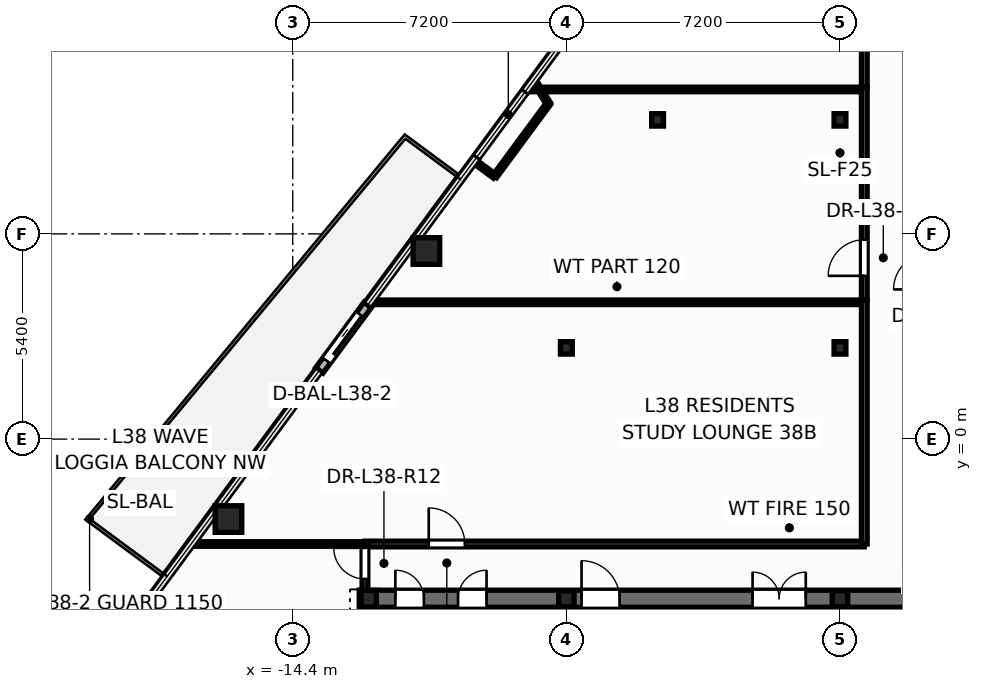
"""IFC4 building model, lengths in metres.
Left out: names, types, materials, properties, quantities, classifications, styles, units other than length and angle.
Written with IfcOpenShell. Run it as: python <this file> out.ifc"""

import sys

from ifc_helpers import new_model, si_unit, direction, frame, frame_2d, origin, origin_2d, place, context, subcontext, project, spatial, rectangle, hollow_circle, i_section, extrude, element, fill, save


model = new_model("IFC4")
c1 = context("Model", 3, precision=1e-05, world=origin(), true_north=direction((0.0, 1.0)))
c2 = subcontext(c1, "Body", "Model", "MODEL_VIEW")
j1 = project(units=[si_unit("LENGTHUNIT", "METRE"), si_unit("PLANEANGLEUNIT", "RADIAN")], contexts=[c1])
p1 = place(None, origin())
s1 = spatial("IfcSite", under=j1, at=p1, CompositionType="ELEMENT")
p2 = place(p1, origin())
s2 = spatial("IfcBuilding", under=s1, at=p2, CompositionType="ELEMENT")
p3 = place(p2, frame((0.0, 0.0, 147.3)))
s3 = spatial("IfcBuildingStorey", under=s2, at=p3, CompositionType="ELEMENT", Elevation=147.3)
for number, where, z_axis, x_axis in (
    (1, (-10.883, 4.95, 0.0), (0.0, 0.0, 1.0), (1.0, 0.0, 0.0)),
    (2, (-16.092, -2.103, 0.0), (0.0, 0.0, 1.0), (1.0, 0.0, 0.0)),
):
    element("IfcColumn", number, at=place(p3, frame(where, z_axis=z_axis, x_axis=x_axis)), inside=s3, PredefinedType="COLUMN", context=c2, shape_type="SweptSolid", body=[
        extrude(hollow_circle(Radius=0.35, WallThickness=0.03, at=origin_2d()), origin(), (0.0, 0.0, 1.0), 3.6),
    ])
p4 = place(p3, frame((-12.4, -4.2, 0.0), z_axis=(0.0, 0.0, 1.0), x_axis=(1.0, 0.0, 0.0)))
e3 = element("IfcColumn", 3, at=p4, inside=s3, PredefinedType="COLUMN", context=c2, shape_type="SweptSolid", body=[
    extrude(i_section(OverallWidth=0.4, OverallDepth=0.44, WebThickness=0.028, FlangeThickness=0.04, at=origin_2d()), origin(), (0.0, 0.0, 1.0), 3.6),
])
for number, where, z_axis, x_axis in (
    (4, (-7.2, -4.2, 0.0), (0.0, 0.0, 1.0), (1.0, 0.0, 0.0)),
    (5, (0.0, -4.2, 0.0), (0.0, 0.0, 1.0), (1.0, 0.0, 0.0)),
):
    element("IfcColumn", number, at=place(p3, frame(where, z_axis=z_axis, x_axis=x_axis)), inside=s3, PredefinedType="PILASTER", context=c2, shape_type="SweptSolid", body=[
        extrude(i_section(OverallWidth=0.405, OverallDepth=0.414, WebThickness=0.022, FlangeThickness=0.032, at=origin_2d()), origin(), (0.0, 0.0, 1.0), 3.6),
    ])
for number, where, z_axis, x_axis in (
    (6, (-7.2, 2.4, 0.0), (0.0, 0.0, 1.0), (1.0, 0.0, 0.0)),
    (7, (0.0, 2.4, 0.0), (0.0, 0.0, 1.0), (1.0, 0.0, 0.0)),
    (8, (-4.8, 8.4, 0.0), (0.0, 0.0, 1.0), (1.0, 0.0, 0.0)),
    (9, (0.0, 8.4, 0.0), (0.0, 0.0, 1.0), (1.0, 0.0, 0.0)),
):
    element("IfcColumn", number, at=place(p3, frame(where, z_axis=z_axis, x_axis=x_axis)), inside=s3, PredefinedType="COLUMN", context=c2, shape_type="SweptSolid", body=[
        extrude(i_section(OverallWidth=0.311, OverallDepth=0.327, WebThickness=0.016, FlangeThickness=0.025, at=origin_2d()), origin(), (0.0, 0.0, 1.0), 3.6),
    ])
p5 = place(p3, frame((-12.429, 3.529, -0.015), z_axis=(0.0, 0.0, 1.0), x_axis=(-0.594050978498, -0.804427395696, 0.0)))
e10 = element("IfcWall", 10, at=p5, inside=s3, PredefinedType="STANDARD", context=c2, shape_type="SweptSolid", body=[
    extrude(rectangle(XDim=2.14, YDim=0.24, at=frame_2d((1.07, 0.0))), origin(), (0.0, 0.0, 1.0), 2.807),
])
p6 = place(p5, frame((0.32, 0.0, 0.015)))
e11 = element("IfcOpeningElement", 11, at=p6, cuts=e10, PredefinedType="OPENING", context=c2, shape_type="SweptSolid", body=[
    extrude(rectangle(XDim=1.506, YDim=2.204, at=frame_2d((0.75, 1.102))), frame((0.0, 0.13, 0.0), z_axis=(0.0, -1.0, 0.0), x_axis=(1.0, 0.0, 0.0)), (0.0, 0.0, 1.0), 0.26),
])
p7 = place(p3, frame((-2.88, -7.1, 0.0), z_axis=(0.0, 0.0, 1.0), x_axis=(0.0, 1.0, 0.0)))
e12 = element("IfcWall", 12, at=p7, inside=s3, PredefinedType="PARTITIONING", context=c2, shape_type="SweptSolid", body=[
    extrude(rectangle(XDim=2.65, YDim=0.15, at=frame_2d((1.325, 0.0))), origin(), (0.0, 0.0, 1.0), 3.35),
])
p8 = place(p7, frame((0.85, 0.0, 0.0)))
e13 = element("IfcOpeningElement", 13, at=p8, cuts=e12, PredefinedType="OPENING", context=c2, shape_type="SweptSolid", body=[
    extrude(rectangle(XDim=0.886, YDim=2.104, at=frame_2d((0.44, 1.052))), frame((0.0, 0.085, 0.0), z_axis=(0.0, -1.0, 0.0), x_axis=(1.0, 0.0, 0.0)), (0.0, 0.0, 1.0), 0.17),
])
p9 = place(p3, frame((-10.2, -5.52, 0.0), z_axis=(0.0, 0.0, 1.0), x_axis=(0.0, 1.0, 0.0)))
e14 = element("IfcWall", 14, at=p9, inside=s3, PredefinedType="PARTITIONING", context=c2, shape_type="SweptSolid", body=[
    extrude(rectangle(XDim=1.12, YDim=0.12, at=frame_2d((0.56, 0.0))), origin(), (0.0, 0.0, 1.0), 3.35),
])
p10 = place(p3, frame((-12.65, -4.2, 0.0), z_axis=(0.0, 0.0, 1.0), x_axis=(1.0, 0.0, 0.0)))
e15 = element("IfcWall", 15, at=p10, inside=s3, PredefinedType="SHEAR", context=c2, shape_type="SweptSolid", body=[
    extrude(rectangle(XDim=25.3, YDim=0.45, at=frame_2d((12.65, 0.0))), origin(), (0.0, 0.0, 1.0), 3.6),
])
p11 = place(p10, frame((0.95, 0.0, 0.0)))
e16 = element("IfcOpeningElement", 16, at=p11, cuts=e15, PredefinedType="OPENING", context=c2, shape_type="SweptSolid", body=[
    extrude(rectangle(XDim=0.756, YDim=2.054, at=frame_2d((0.375, 1.027))), frame((0.0, 0.235, 0.0), z_axis=(0.0, -1.0, 0.0), x_axis=(1.0, 0.0, 0.0)), (0.0, 0.0, 1.0), 0.47),
])
p12 = place(p10, frame((2.6, 0.0, 0.0)))
e17 = element("IfcOpeningElement", 17, at=p12, cuts=e15, PredefinedType="OPENING", context=c2, shape_type="SweptSolid", body=[
    extrude(rectangle(XDim=0.756, YDim=2.054, at=frame_2d((0.375, 1.027))), frame((0.0, 0.235, 0.0), z_axis=(0.0, -1.0, 0.0), x_axis=(1.0, 0.0, 0.0)), (0.0, 0.0, 1.0), 0.47),
])
p13 = place(p10, frame((21.85, 0.0, 0.0)))
e18 = element("IfcOpeningElement", 18, at=p13, cuts=e15, PredefinedType="OPENING", context=c2, shape_type="SweptSolid", body=[
    extrude(rectangle(XDim=0.756, YDim=2.054, at=frame_2d((0.375, 1.027))), frame((0.0, 0.235, 0.0), z_axis=(0.0, -1.0, 0.0), x_axis=(1.0, 0.0, 0.0)), (0.0, 0.0, 1.0), 0.47),
])
p14 = place(p10, frame((23.5, 0.0, 0.0)))
e19 = element("IfcOpeningElement", 19, at=p14, cuts=e15, PredefinedType="OPENING", context=c2, shape_type="SweptSolid", body=[
    extrude(rectangle(XDim=0.756, YDim=2.054, at=frame_2d((0.375, 1.027))), frame((0.0, 0.235, 0.0), z_axis=(0.0, -1.0, 0.0), x_axis=(1.0, 0.0, 0.0)), (0.0, 0.0, 1.0), 0.47),
])
p15 = place(p10, frame((5.85, 0.0, 0.0)))
e20 = element("IfcOpeningElement", 20, at=p15, cuts=e15, PredefinedType="OPENING", context=c2, shape_type="SweptSolid", body=[
    extrude(rectangle(XDim=1.006, YDim=2.104, at=frame_2d((0.5, 1.052))), frame((0.0, 0.235, 0.0), z_axis=(0.0, -1.0, 0.0), x_axis=(1.0, 0.0, 0.0)), (0.0, 0.0, 1.0), 0.47),
])
p16 = place(p10, frame((10.35, 0.0, 0.0)))
e21 = element("IfcOpeningElement", 21, at=p16, cuts=e15, PredefinedType="OPENING", context=c2, shape_type="SweptSolid", body=[
    extrude(rectangle(XDim=1.406, YDim=2.154, at=frame_2d((0.7, 1.077))), frame((0.0, 0.235, 0.0), z_axis=(0.0, -1.0, 0.0), x_axis=(1.0, 0.0, 0.0)), (0.0, 0.0, 1.0), 0.47),
])
p17 = place(p10, frame((18.45, 0.0, 0.0)))
e22 = element("IfcOpeningElement", 22, at=p17, cuts=e15, PredefinedType="OPENING", context=c2, shape_type="SweptSolid", body=[
    extrude(rectangle(XDim=1.006, YDim=2.104, at=frame_2d((0.5, 1.052))), frame((0.0, 0.235, 0.0), z_axis=(0.0, -1.0, 0.0), x_axis=(1.0, 0.0, 0.0)), (0.0, 0.0, 1.0), 0.47),
])
p18 = place(p3, frame((-8.48, -13.85, 0.0), z_axis=(0.0, 0.0, 1.0), x_axis=(0.0, 1.0, 0.0)))
e23 = element("IfcWall", 23, at=p18, inside=s3, PredefinedType="SHEAR", context=c2, shape_type="SweptSolid", body=[
    extrude(rectangle(XDim=9.4, YDim=0.25, at=frame_2d((4.7, 0.0))), origin(), (0.0, 0.0, 1.0), 3.6),
])
p19 = place(p18, frame((6.95, 0.0, 0.0)))
e24 = element("IfcOpeningElement", 24, at=p19, cuts=e23, PredefinedType="OPENING", context=c2, shape_type="SweptSolid", body=[
    extrude(rectangle(XDim=1.006, YDim=2.104, at=frame_2d((0.5, 1.052))), frame((0.0, 0.135, 0.0), z_axis=(0.0, -1.0, 0.0), x_axis=(1.0, 0.0, 0.0)), (0.0, 0.0, 1.0), 0.27),
])
p20 = place(p3, frame((-5.12, -13.85, 0.0), z_axis=(0.0, 0.0, 1.0), x_axis=(0.0, 1.0, 0.0)))
e25 = element("IfcWall", 25, at=p20, inside=s3, PredefinedType="SHEAR", context=c2, shape_type="SweptSolid", body=[
    extrude(rectangle(XDim=9.4, YDim=0.25, at=frame_2d((4.7, 0.0))), origin(), (0.0, 0.0, 1.0), 3.6),
])
p21 = place(p3, frame((-12.4, -13.85, 0.0), z_axis=(0.0, 0.0, 1.0), x_axis=(0.0, 1.0, 0.0)))
e26 = element("IfcWall", 26, at=p21, inside=s3, PredefinedType="SHEAR", context=c2, shape_type="SweptSolid", body=[
    extrude(rectangle(XDim=9.4, YDim=0.45, at=frame_2d((4.7, 0.0))), origin(), (0.0, 0.0, 1.0), 3.6),
])
p22 = place(p3, frame((-12.5, -2.76, 0.0), z_axis=(0.0, 0.0, 1.0), x_axis=(1.0, 0.0, 0.0)))
e27 = element("IfcWall", 27, at=p22, inside=s3, PredefinedType="PARTITIONING", context=c2, shape_type="SweptSolid", body=[
    extrude(rectangle(XDim=13.14, YDim=0.15, at=frame_2d((6.57, 0.0))), origin(), (0.0, 0.0, 1.0), 2.325),
])
p23 = place(p22, frame((1.679, 0.0, 0.0)))
e28 = element("IfcOpeningElement", 28, at=p23, cuts=e27, PredefinedType="OPENING", context=c2, shape_type="SweptSolid", body=[
    extrude(rectangle(XDim=0.956, YDim=2.104, at=frame_2d((0.475, 1.052))), frame((0.0, 0.085, 0.0), z_axis=(0.0, -1.0, 0.0), x_axis=(1.0, 0.0, 0.0)), (0.0, 0.0, 1.0), 0.17),
])
p24 = place(p3, frame((-12.377, 3.6, 0.0), z_axis=(0.0, 0.0, 1.0), x_axis=(1.0, 0.0, 0.0)))
e29 = element("IfcWall", 29, at=p24, inside=s3, PredefinedType="PARTITIONING", context=c2, shape_type="SweptSolid", body=[
    extrude(rectangle(XDim=13.017, YDim=0.12, at=frame_2d((6.508, 0.0))), origin(), (0.0, 0.0, 1.0), 2.325),
])
p25 = place(p3, frame((-8.12, 9.2, 0.0), z_axis=(0.0, 0.0, 1.0), x_axis=(1.0, 0.0, 0.0)))
e30 = element("IfcWall", 30, at=p25, inside=s3, PredefinedType="PARTITIONING", context=c2, shape_type="SweptSolid", body=[
    extrude(rectangle(XDim=8.76, YDim=0.12, at=frame_2d((4.38, 0.0))), origin(), (0.0, 0.0, 1.0), 2.617),
])
p26 = place(p3, frame((0.64, -2.76, 0.0), z_axis=(0.0, 0.0, 1.0), x_axis=(0.0, 1.0, 0.0)))
e31 = element("IfcWall", 31, at=p26, inside=s3, PredefinedType="PARTITIONING", context=c2, shape_type="SweptSolid", body=[
    extrude(rectangle(XDim=6.42, YDim=0.15, at=frame_2d((3.21, 0.0))), origin(), (0.0, 0.0, 1.0), 2.325),
])
p27 = place(p3, frame((0.64, 3.662, 0.0), z_axis=(0.0, 0.0, 1.0), x_axis=(0.0, 1.0, 0.0)))
e32 = element("IfcWall", 32, at=p27, inside=s3, PredefinedType="PARTITIONING", context=c2, shape_type="SweptSolid", body=[
    extrude(rectangle(XDim=5.598, YDim=0.15, at=frame_2d((2.799, 0.0))), origin(), (0.0, 0.0, 1.0), 2.617),
])
p28 = place(p27, frame((0.634, 0.0, 0.0)))
e33 = element("IfcOpeningElement", 33, at=p28, cuts=e32, PredefinedType="OPENING", context=c2, shape_type="SweptSolid", body=[
    extrude(rectangle(XDim=0.956, YDim=2.104, at=frame_2d((0.475, 1.052))), frame((0.0, 0.085, 0.0), z_axis=(0.0, -1.0, 0.0), x_axis=(1.0, 0.0, 0.0)), (0.0, 0.0, 1.0), 0.17),
])
p29 = place(p3, frame((-17.074, -2.76, 0.0), z_axis=(0.0, 0.0, 1.0), x_axis=(1.0, 0.0, 0.0)))
e34 = element("IfcWall", 34, at=p29, inside=s3, PredefinedType="PARTITIONING", context=c2, shape_type="SweptSolid", body=[
    extrude(rectangle(XDim=4.574, YDim=0.12, at=frame_2d((2.287, 0.0))), origin(), (0.0, 0.0, 1.0), 2.792),
])
p30 = place(p3, frame((0.64, 9.262, 0.0), z_axis=(0.0, 0.0, 1.0), x_axis=(0.0, 1.0, 0.0)))
e35 = element("IfcWall", 35, at=p30, inside=s3, PredefinedType="PARTITIONING", context=c2, shape_type="SweptSolid", body=[
    extrude(rectangle(XDim=2.538, YDim=0.15, at=frame_2d((1.269, 0.0))), origin(), (0.0, 0.0, 1.0), 3.35),
])
p31 = place(p30, frame((1.031, 0.0, 0.0)))
e36 = element("IfcOpeningElement", 36, at=p31, cuts=e35, PredefinedType="OPENING", context=c2, shape_type="SweptSolid", body=[
    extrude(rectangle(XDim=0.956, YDim=2.104, at=frame_2d((0.475, 1.052))), frame((0.0, 0.085, 0.0), z_axis=(0.0, -1.0, 0.0), x_axis=(1.0, 0.0, 0.0)), (0.0, 0.0, 1.0), 0.17),
])
for number, where, z_axis, x_axis in (
    (37, (-7.671, 8.827, 0.0), (0.0, 0.0, 1.0), (-0.594, -0.804, 0.0)),
    (38, (-17.49, -4.468, 0.0), (0.0, 0.0, 1.0), (-0.594, -0.804, 0.0)),
):
    element("IfcWall", number, at=place(p3, frame(where, z_axis=z_axis, x_axis=x_axis)), inside=s3, PredefinedType="PARTITIONING", context=c2, shape_type="SweptSolid", body=[
        extrude(rectangle(XDim=2.378, YDim=0.12, at=frame_2d((1.189, 0.0))), origin(), (0.0, 0.0, 1.0), 3.35),
    ])
p32 = place(p3, frame((-12.5, -4.24, 0.0), z_axis=(0.0, 0.0, 1.0), x_axis=(0.0, 1.0, 0.0)))
e39 = element("IfcWall", 39, at=p32, inside=s3, PredefinedType="PARTITIONING", context=c2, shape_type="SweptSolid", body=[
    extrude(rectangle(XDim=1.48, YDim=0.15, at=frame_2d((0.74, 0.0))), origin(), (0.0, 0.0, 1.0), 2.325),
])
p33 = place(p32, frame((0.56, 0.0, 0.0)))
e40 = element("IfcOpeningElement", 40, at=p33, cuts=e39, PredefinedType="OPENING", context=c2, shape_type="SweptSolid", body=[
    extrude(rectangle(XDim=0.826, YDim=2.104, at=frame_2d((0.41, 1.052))), frame((0.0, 0.085, 0.0), z_axis=(0.0, -1.0, 0.0), x_axis=(1.0, 0.0, 0.0)), (0.0, 0.0, 1.0), 0.17),
])
p34 = place(p3, frame((-8.054, 9.437, 0.0), z_axis=(0.0, 0.0, 1.0), x_axis=(0.531553111266, -0.847024964156, 0.0)))
e41 = element("IfcWall", 41, at=p34, inside=s3, PredefinedType="PARTITIONING", context=c2, shape_type="SweptSolid", body=[
    extrude(rectangle(XDim=0.72, YDim=0.12, at=frame_2d((0.36, 0.0))), origin(), (0.0, 0.0, 1.0), 2.792),
])
for number, where, z_axis, x_axis in (
    (42, (-9.084, 6.914, 0.0), (0.0, 0.0, 1.0), (-0.804, 0.594, 0.0)),
    (43, (-18.029, -4.07, 0.0), (0.0, 0.0, 1.0), (0.805, -0.594, 0.0)),
):
    element("IfcWall", number, at=place(p3, frame(where, z_axis=z_axis, x_axis=x_axis)), inside=s3, PredefinedType="PARTITIONING", context=c2, shape_type="SweptSolid", body=[
        extrude(rectangle(XDim=0.67, YDim=0.12, at=frame_2d((0.335, 0.0))), origin(), (0.0, 0.0, 1.0), 2.792),
    ])
p35 = place(p6, origin())
e44 = element("IfcDoor", 44, at=p35, inside=s3, OperationType="SLIDING_TO_RIGHT", PredefinedType="DOOR", context=c2, shape_type="SweptSolid", body=[
    extrude(rectangle(XDim=1.5, YDim=2.2, at=frame_2d((0.75, 1.1))), frame((0.0, 0.025, 0.0), z_axis=(0.0, -1.0, 0.0), x_axis=(1.0, 0.0, 0.0)), (0.0, 0.0, 1.0), 0.05),
])
fill(e11, e44)
p36 = place(p11, origin())
e45 = element("IfcDoor", 45, at=p36, inside=s3, OperationType="SINGLE_SWING_LEFT", PredefinedType="DOOR", context=c2, shape_type="SweptSolid", body=[
    extrude(rectangle(XDim=0.75, YDim=2.05, at=frame_2d((0.375, 1.025))), frame((0.0, 0.025, 0.0), z_axis=(0.0, -1.0, 0.0), x_axis=(1.0, 0.0, 0.0)), (0.0, 0.0, 1.0), 0.05),
])
fill(e16, e45)
p37 = place(p12, origin())
e46 = element("IfcDoor", 46, at=p37, inside=s3, OperationType="SINGLE_SWING_RIGHT", PredefinedType="DOOR", context=c2, shape_type="SweptSolid", body=[
    extrude(rectangle(XDim=0.75, YDim=2.05, at=frame_2d((0.375, 1.025))), frame((0.0, 0.025, 0.0), z_axis=(0.0, -1.0, 0.0), x_axis=(1.0, 0.0, 0.0)), (0.0, 0.0, 1.0), 0.05),
])
fill(e17, e46)
p38 = place(p15, origin())
e47 = element("IfcDoor", 47, at=p38, inside=s3, OperationType="SINGLE_SWING_LEFT", PredefinedType="DOOR", context=c2, shape_type="SweptSolid", body=[
    extrude(rectangle(XDim=1.0, YDim=2.1, at=frame_2d((0.5, 1.05))), frame((0.0, 0.025, 0.0), z_axis=(0.0, -1.0, 0.0), x_axis=(1.0, 0.0, 0.0)), (0.0, 0.0, 1.0), 0.05),
])
fill(e20, e47)
p39 = place(p16, origin())
e48 = element("IfcDoor", 48, at=p39, inside=s3, OperationType="DOUBLE_DOOR_SINGLE_SWING", PredefinedType="DOOR", context=c2, shape_type="SweptSolid", body=[
    extrude(rectangle(XDim=1.4, YDim=2.15, at=frame_2d((0.7, 1.075))), frame((0.0, 0.025, 0.0), z_axis=(0.0, -1.0, 0.0), x_axis=(1.0, 0.0, 0.0)), (0.0, 0.0, 1.0), 0.05),
])
fill(e21, e48)
p40 = place(p28, origin())
e49 = element("IfcDoor", 49, at=p40, inside=s3, OperationType="SINGLE_SWING_LEFT", PredefinedType="DOOR", context=c2, shape_type="SweptSolid", body=[
    extrude(rectangle(XDim=0.95, YDim=2.1, at=frame_2d((0.475, 1.05))), frame((0.0, 0.025, 0.0), z_axis=(0.0, -1.0, 0.0), x_axis=(1.0, 0.0, 0.0)), (0.0, 0.0, 1.0), 0.05),
])
fill(e33, e49)
p41 = place(p33, origin())
e50 = element("IfcDoor", 50, at=p41, inside=s3, OperationType="SINGLE_SWING_RIGHT", PredefinedType="DOOR", context=c2, shape_type="SweptSolid", body=[
    extrude(rectangle(XDim=0.82, YDim=2.1, at=frame_2d((0.41, 1.05))), frame((0.0, 0.025, 0.0), z_axis=(0.0, -1.0, 0.0), x_axis=(1.0, 0.0, 0.0)), (0.0, 0.0, 1.0), 0.05),
])
fill(e40, e50)
p42 = place(p23, origin())
e51 = element("IfcDoor", 51, at=p42, inside=s3, OperationType="SINGLE_SWING_LEFT", PredefinedType="DOOR", context=c2, shape_type="SweptSolid", body=[
    extrude(rectangle(XDim=0.95, YDim=2.1, at=frame_2d((0.475, 1.05))), frame((0.0, 0.025, 0.0), z_axis=(0.0, -1.0, 0.0), x_axis=(1.0, 0.0, 0.0)), (0.0, 0.0, 1.0), 0.05),
])
fill(e28, e51)
save(model, sys.argv[1])
